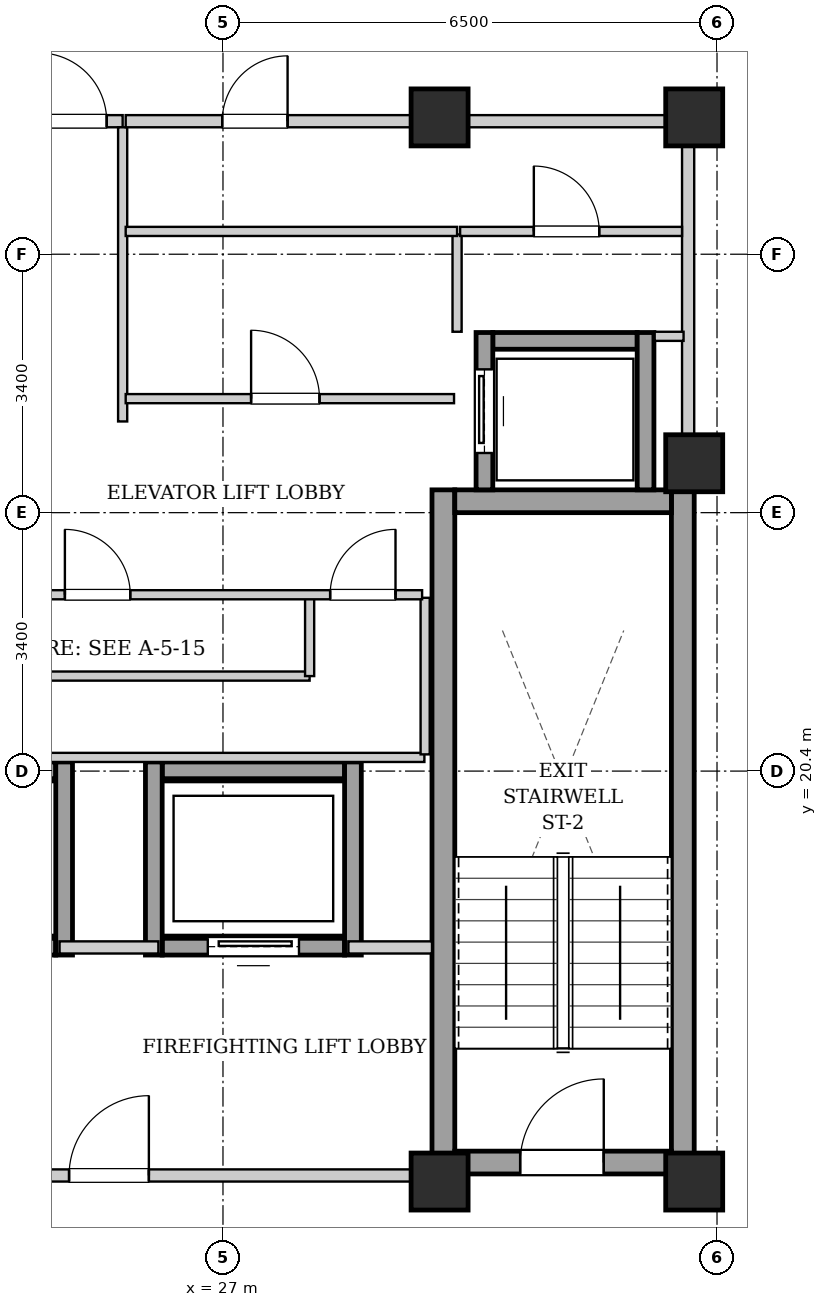
"""IFC4 building model, lengths in metres.
Left out: names, types, materials, properties, quantities, classifications, styles, units other than length and angle.
Written with IfcOpenShell. Run it as: python <this file> out.ifc"""

import sys

from ifc_helpers import new_model, si_unit, direction, frame, frame_2d, origin, origin_2d, place, context, subcontext, project, spatial, rectangle, extrude, element, fill, save


model = new_model("IFC4")
c1 = context("Model", 3, precision=1e-05, world=origin(), true_north=direction((0.0, 1.0)))
c2 = subcontext(c1, "Body", "Model", "MODEL_VIEW")
j1 = project(units=[si_unit("LENGTHUNIT", "METRE"), si_unit("PLANEANGLEUNIT", "RADIAN")], contexts=[c1])
p1 = place(None, origin())
s1 = spatial("IfcSite", under=j1, at=p1, CompositionType="ELEMENT")
p2 = place(p1, origin())
s2 = spatial("IfcBuilding", under=s1, at=p2, CompositionType="ELEMENT")
p3 = place(p2, frame((0.0, 0.0, 241.1)))
s3 = spatial("IfcBuildingStorey", under=s2, at=p3, CompositionType="ELEMENT", Elevation=241.1)
for number, where, z_axis, x_axis in (
    (1, (29.85, 15.0, 0.0), (0.0, 0.0, 1.0), (1.0, 0.0, 0.0)),
    (2, (33.2, 15.0, 0.0), (0.0, 0.0, 1.0), (1.0, 0.0, 0.0)),
    (3, (29.85, 29.0, 0.0), (0.0, 0.0, 1.0), (1.0, 0.0, 0.0)),
    (4, (33.2, 29.0, 0.0), (0.0, 0.0, 1.0), (1.0, 0.0, 0.0)),
    (5, (33.2, 24.45, 0.0), (0.0, 0.0, 1.0), (1.0, 0.0, 0.0)),
):
    element("IfcColumn", number, at=place(p3, frame(where, z_axis=z_axis, x_axis=x_axis)), inside=s3, PredefinedType="COLUMN", context=c2, shape_type="SweptSolid", body=[
        extrude(rectangle(XDim=0.75, YDim=0.75, at=origin_2d()), origin(), (0.0, 0.0, 1.0), 3.4),
    ])
for number, where, z_axis, x_axis in (
    (6, (29.9, 15.1, 0.0), (0.0, 0.0, 1.0), (0.0, 1.0, 0.0)),
    (7, (33.05, 15.1, 0.0), (0.0, 0.0, 1.0), (0.0, 1.0, 0.0)),
):
    element("IfcWall", number, at=place(p3, frame(where, z_axis=z_axis, x_axis=x_axis)), inside=s3, PredefinedType="SHEAR", context=c2, shape_type="SweptSolid", body=[
        extrude(rectangle(XDim=9.0, YDim=0.3, at=frame_2d((4.5, 0.0))), origin(), (0.0, 0.0, 1.0), 3.14),
    ])
p4 = place(p3, frame((30.05, 23.95, 0.0), z_axis=(0.0, 0.0, 1.0), x_axis=(1.0, 0.0, 0.0)))
e8 = element("IfcWall", 8, at=p4, inside=s3, PredefinedType="SHEAR", context=c2, shape_type="SweptSolid", body=[
    extrude(rectangle(XDim=2.85, YDim=0.3, at=frame_2d((1.425, 0.0))), origin(), (0.0, 0.0, 1.0), 3.14),
])
p5 = place(p3, frame((30.05, 15.25, 0.0), z_axis=(0.0, 0.0, 1.0), x_axis=(1.0, 0.0, 0.0)))
e9 = element("IfcWall", 9, at=p5, inside=s3, PredefinedType="SHEAR", context=c2, shape_type="SweptSolid", body=[
    extrude(rectangle(XDim=2.85, YDim=0.3, at=frame_2d((1.425, 0.0))), origin(), (0.0, 0.0, 1.0), 3.14),
])
p6 = place(p5, frame((0.86, 0.0, 0.0)))
e10 = element("IfcOpeningElement", 10, at=p6, cuts=e9, PredefinedType="OPENING", context=c2, shape_type="SweptSolid", body=[
    extrude(rectangle(XDim=1.1, YDim=2.05, at=frame_2d((0.55, 1.025))), frame((0.0, 0.16, 0.0), z_axis=(0.0, -1.0, 0.0), x_axis=(1.0, 0.0, 0.0)), (0.0, 0.0, 1.0), 0.32),
])
p7 = place(p3, frame((30.55, 26.06, 0.0), z_axis=(0.0, 0.0, 1.0), x_axis=(1.0, 0.0, 0.0)))
e11 = element("IfcWall", 11, at=p7, inside=s3, PredefinedType="SHEAR", context=c2, shape_type="SweptSolid", body=[
    extrude(rectangle(XDim=1.9, YDim=0.22, at=frame_2d((0.95, 0.0))), origin(), (0.0, 0.0, 1.0), 3.14),
])
p8 = place(p3, frame((30.44, 24.1, 0.0), z_axis=(0.0, 0.0, 1.0), x_axis=(0.0, 1.0, 0.0)))
e12 = element("IfcWall", 12, at=p8, inside=s3, PredefinedType="SHEAR", context=c2, shape_type="SweptSolid", body=[
    extrude(rectangle(XDim=2.07, YDim=0.22, at=frame_2d((1.035, 0.0))), origin(), (0.0, 0.0, 1.0), 3.14),
])
p9 = place(p8, frame((0.485, 0.0, 0.0)))
e13 = element("IfcOpeningElement", 13, at=p9, cuts=e12, PredefinedType="OPENING", context=c2, shape_type="SweptSolid", body=[
    extrude(rectangle(XDim=1.1, YDim=2.15, at=frame_2d((0.55, 1.075))), frame((0.0, 0.12, 0.0), z_axis=(0.0, -1.0, 0.0), x_axis=(1.0, 0.0, 0.0)), (0.0, 0.0, 1.0), 0.24),
])
p10 = place(p3, frame((32.56, 24.1, 0.0), z_axis=(0.0, 0.0, 1.0), x_axis=(0.0, 1.0, 0.0)))
e14 = element("IfcWall", 14, at=p10, inside=s3, PredefinedType="SHEAR", context=c2, shape_type="SweptSolid", body=[
    extrude(rectangle(XDim=2.07, YDim=0.22, at=frame_2d((1.035, 0.0))), origin(), (0.0, 0.0, 1.0), 3.14),
])
p11 = place(p3, frame((22.4, 18.09, 0.0), z_axis=(0.0, 0.0, 1.0), x_axis=(1.0, 0.0, 0.0)))
e15 = element("IfcWall", 15, at=p11, inside=s3, PredefinedType="SHEAR", context=c2, shape_type="SweptSolid", body=[
    extrude(rectangle(XDim=2.4, YDim=0.22, at=frame_2d((1.2, 0.0))), origin(), (0.0, 0.0, 1.0), 3.14),
])
p12 = place(p11, frame((0.6, 0.0, 0.0)))
e16 = element("IfcOpeningElement", 16, at=p12, cuts=e15, PredefinedType="OPENING", context=c2, shape_type="SweptSolid", body=[
    extrude(rectangle(XDim=1.2, YDim=2.15, at=frame_2d((0.6, 1.075))), frame((0.0, 0.12, 0.0), z_axis=(0.0, -1.0, 0.0), x_axis=(1.0, 0.0, 0.0)), (0.0, 0.0, 1.0), 0.24),
])
p13 = place(p3, frame((22.4, 20.41, 0.0), z_axis=(0.0, 0.0, 1.0), x_axis=(1.0, 0.0, 0.0)))
e17 = element("IfcWall", 17, at=p13, inside=s3, PredefinedType="SHEAR", context=c2, shape_type="SweptSolid", body=[
    extrude(rectangle(XDim=2.4, YDim=0.22, at=frame_2d((1.2, 0.0))), origin(), (0.0, 0.0, 1.0), 3.14),
])
p14 = place(p3, frame((24.91, 17.98, 0.0), z_axis=(0.0, 0.0, 1.0), x_axis=(0.0, 1.0, 0.0)))
e18 = element("IfcWall", 18, at=p14, inside=s3, PredefinedType="SHEAR", context=c2, shape_type="SweptSolid", body=[
    extrude(rectangle(XDim=2.54, YDim=0.22, at=frame_2d((1.27, 0.0))), origin(), (0.0, 0.0, 1.0), 3.14),
])
p15 = place(p3, frame((26.2, 18.09, 0.0), z_axis=(0.0, 0.0, 1.0), x_axis=(1.0, 0.0, 0.0)))
e19 = element("IfcWall", 19, at=p15, inside=s3, PredefinedType="SHEAR", context=c2, shape_type="SweptSolid", body=[
    extrude(rectangle(XDim=2.4, YDim=0.22, at=frame_2d((1.2, 0.0))), origin(), (0.0, 0.0, 1.0), 3.14),
])
p16 = place(p15, frame((0.6, 0.0, 0.0)))
e20 = element("IfcOpeningElement", 20, at=p16, cuts=e19, PredefinedType="OPENING", context=c2, shape_type="SweptSolid", body=[
    extrude(rectangle(XDim=1.2, YDim=2.15, at=frame_2d((0.6, 1.075))), frame((0.0, 0.12, 0.0), z_axis=(0.0, -1.0, 0.0), x_axis=(1.0, 0.0, 0.0)), (0.0, 0.0, 1.0), 0.24),
])
p17 = place(p3, frame((26.2, 20.41, 0.0), z_axis=(0.0, 0.0, 1.0), x_axis=(1.0, 0.0, 0.0)))
e21 = element("IfcWall", 21, at=p17, inside=s3, PredefinedType="SHEAR", context=c2, shape_type="SweptSolid", body=[
    extrude(rectangle(XDim=2.4, YDim=0.22, at=frame_2d((1.2, 0.0))), origin(), (0.0, 0.0, 1.0), 3.14),
])
for number, where, z_axis, x_axis in (
    (22, (26.09, 17.98, 0.0), (0.0, 0.0, 1.0), (0.0, 1.0, 0.0)),
    (23, (28.71, 17.98, 0.0), (0.0, 0.0, 1.0), (0.0, 1.0, 0.0)),
):
    element("IfcWall", number, at=place(p3, frame(where, z_axis=z_axis, x_axis=x_axis)), inside=s3, PredefinedType="SHEAR", context=c2, shape_type="SweptSolid", body=[
        extrude(rectangle(XDim=2.54, YDim=0.22, at=frame_2d((1.27, 0.0))), origin(), (0.0, 0.0, 1.0), 3.14),
    ])
p18 = place(p3, frame((21.25, 15.08, 0.0), z_axis=(0.0, 0.0, 1.0), x_axis=(1.0, 0.0, 0.0)))
e24 = element("IfcWall", 24, at=p18, inside=s3, PredefinedType="PARTITIONING", context=c2, shape_type="SweptSolid", body=[
    extrude(rectangle(XDim=8.5, YDim=0.16, at=frame_2d((4.25, 0.0))), origin(), (0.0, 0.0, 1.0), 2.668),
])
p19 = place(p18, frame((3.725, 0.0, 0.0)))
e25 = element("IfcOpeningElement", 25, at=p19, cuts=e24, PredefinedType="OPENING", context=c2, shape_type="SweptSolid", body=[
    extrude(rectangle(XDim=1.05, YDim=2.05, at=frame_2d((0.525, 1.025))), frame((0.0, 0.09, 0.0), z_axis=(0.0, -1.0, 0.0), x_axis=(1.0, 0.0, 0.0)), (0.0, 0.0, 1.0), 0.18),
])
p20 = place(p3, frame((24.85, 18.08, 0.0), z_axis=(0.0, 0.0, 1.0), x_axis=(1.0, 0.0, 0.0)))
e26 = element("IfcWall", 26, at=p20, inside=s3, PredefinedType="PARTITIONING", context=c2, shape_type="SweptSolid", body=[
    extrude(rectangle(XDim=1.3, YDim=0.16, at=frame_2d((0.65, 0.0))), origin(), (0.0, 0.0, 1.0), 3.14),
])
p21 = place(p3, frame((28.65, 18.08, 0.0), z_axis=(0.0, 0.0, 1.0), x_axis=(1.0, 0.0, 0.0)))
e27 = element("IfcWall", 27, at=p21, inside=s3, PredefinedType="PARTITIONING", context=c2, shape_type="SweptSolid", body=[
    extrude(rectangle(XDim=1.1, YDim=0.16, at=frame_2d((0.55, 0.0))), origin(), (0.0, 0.0, 1.0), 3.14),
])
p22 = place(p3, frame((33.12, 24.12, 0.0), z_axis=(0.0, 0.0, 1.0), x_axis=(0.0, 1.0, 0.0)))
e28 = element("IfcWall", 28, at=p22, inside=s3, PredefinedType="PARTITIONING", context=c2, shape_type="SweptSolid", body=[
    extrude(rectangle(XDim=4.76, YDim=0.16, at=frame_2d((2.38, 0.0))), origin(), (0.0, 0.0, 1.0), 3.14),
])
p23 = place(p3, frame((24.36, 28.95, 0.0), z_axis=(0.0, 0.0, 1.0), x_axis=(1.0, 0.0, 0.0)))
e29 = element("IfcWall", 29, at=p23, inside=s3, PredefinedType="PARTITIONING", context=c2, shape_type="SweptSolid", body=[
    extrude(rectangle(XDim=1.32, YDim=0.16, at=frame_2d((0.66, 0.0))), origin(), (0.0, 0.0, 1.0), 2.668),
])
p24 = place(p23, frame((0.21, 0.0, 0.0)))
e30 = element("IfcOpeningElement", 30, at=p24, cuts=e29, PredefinedType="OPENING", context=c2, shape_type="SweptSolid", body=[
    extrude(rectangle(XDim=0.9, YDim=2.05, at=frame_2d((0.45, 1.025))), frame((0.0, 0.09, 0.0), z_axis=(0.0, -1.0, 0.0), x_axis=(1.0, 0.0, 0.0)), (0.0, 0.0, 1.0), 0.18),
])
p25 = place(p3, frame((25.68, 25.0, 0.0), z_axis=(0.0, 0.0, 1.0), x_axis=(0.0, 1.0, 0.0)))
e31 = element("IfcWall", 31, at=p25, inside=s3, PredefinedType="PARTITIONING", context=c2, shape_type="SweptSolid", body=[
    extrude(rectangle(XDim=3.87, YDim=0.12, at=frame_2d((1.935, 0.0))), origin(), (0.0, 0.0, 1.0), 3.14),
])
p26 = place(p3, frame((30.08, 26.18, 0.0), z_axis=(0.0, 0.0, 1.0), x_axis=(0.0, 1.0, 0.0)))
e32 = element("IfcWall", 32, at=p26, inside=s3, PredefinedType="PARTITIONING", context=c2, shape_type="SweptSolid", body=[
    extrude(rectangle(XDim=1.28, YDim=0.12, at=frame_2d((0.64, 0.0))), origin(), (0.0, 0.0, 1.0), 3.14),
])
p27 = place(p3, frame((32.68, 26.12, 0.0), z_axis=(0.0, 0.0, 1.0), x_axis=(1.0, 0.0, 0.0)))
e33 = element("IfcWall", 33, at=p27, inside=s3, PredefinedType="PARTITIONING", context=c2, shape_type="SweptSolid", body=[
    extrude(rectangle(XDim=0.38, YDim=0.12, at=frame_2d((0.19, 0.0))), origin(), (0.0, 0.0, 1.0), 3.14),
])
p28 = place(p3, frame((30.12, 27.5, 0.0), z_axis=(0.0, 0.0, 1.0), x_axis=(1.0, 0.0, 0.0)))
e34 = element("IfcWall", 34, at=p28, inside=s3, PredefinedType="PARTITIONING", context=c2, shape_type="SweptSolid", body=[
    extrude(rectangle(XDim=2.92, YDim=0.12, at=frame_2d((1.46, 0.0))), origin(), (0.0, 0.0, 1.0), 3.14),
])
p29 = place(p28, frame((0.97, 0.0, 0.0)))
e35 = element("IfcOpeningElement", 35, at=p29, cuts=e34, PredefinedType="OPENING", context=c2, shape_type="SweptSolid", body=[
    extrude(rectangle(XDim=0.86, YDim=2.05, at=frame_2d((0.43, 1.025))), frame((0.0, 0.07, 0.0), z_axis=(0.0, -1.0, 0.0), x_axis=(1.0, 0.0, 0.0)), (0.0, 0.0, 1.0), 0.14),
])
p30 = place(p3, frame((25.72, 27.5, 0.0), z_axis=(0.0, 0.0, 1.0), x_axis=(1.0, 0.0, 0.0)))
e36 = element("IfcWall", 36, at=p30, inside=s3, PredefinedType="PARTITIONING", context=c2, shape_type="SweptSolid", body=[
    extrude(rectangle(XDim=4.36, YDim=0.12, at=frame_2d((2.18, 0.0))), origin(), (0.0, 0.0, 1.0), 3.14),
])
p31 = place(p3, frame((25.72, 25.3, 0.0), z_axis=(0.0, 0.0, 1.0), x_axis=(1.0, 0.0, 0.0)))
e37 = element("IfcWall", 37, at=p31, inside=s3, PredefinedType="PARTITIONING", context=c2, shape_type="SweptSolid", body=[
    extrude(rectangle(XDim=4.32, YDim=0.12, at=frame_2d((2.16, 0.0))), origin(), (0.0, 0.0, 1.0), 3.14),
])
p32 = place(p31, frame((1.65, 0.0, 0.0)))
e38 = element("IfcOpeningElement", 38, at=p32, cuts=e37, PredefinedType="OPENING", context=c2, shape_type="SweptSolid", body=[
    extrude(rectangle(XDim=0.9, YDim=2.05, at=frame_2d((0.45, 1.025))), frame((0.0, 0.07, 0.0), z_axis=(0.0, -1.0, 0.0), x_axis=(1.0, 0.0, 0.0)), (0.0, 0.0, 1.0), 0.14),
])
p33 = place(p3, frame((25.72, 28.95, 0.0), z_axis=(0.0, 0.0, 1.0), x_axis=(1.0, 0.0, 0.0)))
e39 = element("IfcWall", 39, at=p33, inside=s3, PredefinedType="PARTITIONING", context=c2, shape_type="SweptSolid", body=[
    extrude(rectangle(XDim=7.32, YDim=0.16, at=frame_2d((3.66, 0.0))), origin(), (0.0, 0.0, 1.0), 2.668),
])
p34 = place(p33, frame((1.27, 0.0, 0.0)))
e40 = element("IfcOpeningElement", 40, at=p34, cuts=e39, PredefinedType="OPENING", context=c2, shape_type="SweptSolid", body=[
    extrude(rectangle(XDim=0.86, YDim=2.05, at=frame_2d((0.43, 1.025))), frame((0.0, 0.09, 0.0), z_axis=(0.0, -1.0, 0.0), x_axis=(1.0, 0.0, 0.0)), (0.0, 0.0, 1.0), 0.18),
])
p35 = place(p3, frame((22.3, 20.58, 0.0), z_axis=(0.0, 0.0, 1.0), x_axis=(1.0, 0.0, 0.0)))
e41 = element("IfcWall", 41, at=p35, inside=s3, PredefinedType="PARTITIONING", context=c2, shape_type="SweptSolid", body=[
    extrude(rectangle(XDim=7.35, YDim=0.12, at=frame_2d((3.675, 0.0))), origin(), (0.0, 0.0, 1.0), 3.14),
])
p36 = place(p3, frame((29.66, 20.62, 0.0), z_axis=(0.0, 0.0, 1.0), x_axis=(0.0, 1.0, 0.0)))
e42 = element("IfcWall", 42, at=p36, inside=s3, PredefinedType="PARTITIONING", context=c2, shape_type="SweptSolid", body=[
    extrude(rectangle(XDim=2.06, YDim=0.12, at=frame_2d((1.03, 0.0))), origin(), (0.0, 0.0, 1.0), 3.14),
])
p37 = place(p3, frame((22.35, 21.65, 0.0), z_axis=(0.0, 0.0, 1.0), x_axis=(1.0, 0.0, 0.0)))
e43 = element("IfcWall", 43, at=p37, inside=s3, PredefinedType="PARTITIONING", context=c2, shape_type="SweptSolid", body=[
    extrude(rectangle(XDim=5.79, YDim=0.12, at=frame_2d((2.895, 0.0))), origin(), (0.0, 0.0, 1.0), 3.14),
])
p38 = place(p3, frame((28.14, 21.65, 0.0), z_axis=(0.0, 0.0, 1.0), x_axis=(0.0, 1.0, 0.0)))
e44 = element("IfcWall", 44, at=p38, inside=s3, PredefinedType="PARTITIONING", context=c2, shape_type="SweptSolid", body=[
    extrude(rectangle(XDim=1.03, YDim=0.12, at=frame_2d((0.515, 0.0))), origin(), (0.0, 0.0, 1.0), 3.14),
])
p39 = place(p3, frame((22.35, 22.72, 0.0), z_axis=(0.0, 0.0, 1.0), x_axis=(1.0, 0.0, 0.0)))
e45 = element("IfcWall", 45, at=p39, inside=s3, PredefinedType="PARTITIONING", context=c2, shape_type="SweptSolid", body=[
    extrude(rectangle(XDim=7.27, YDim=0.12, at=frame_2d((3.635, 0.0))), origin(), (0.0, 0.0, 1.0), 3.14),
])
p40 = place(p39, frame((2.57, 0.0, 0.0)))
e46 = element("IfcOpeningElement", 46, at=p40, cuts=e45, PredefinedType="OPENING", context=c2, shape_type="SweptSolid", body=[
    extrude(rectangle(XDim=0.86, YDim=2.05, at=frame_2d((0.43, 1.025))), frame((0.0, 0.07, 0.0), z_axis=(0.0, -1.0, 0.0), x_axis=(1.0, 0.0, 0.0)), (0.0, 0.0, 1.0), 0.14),
])
p41 = place(p39, frame((6.06, 0.0, 0.0)))
e47 = element("IfcOpeningElement", 47, at=p41, cuts=e45, PredefinedType="OPENING", context=c2, shape_type="SweptSolid", body=[
    extrude(rectangle(XDim=0.86, YDim=2.05, at=frame_2d((0.43, 1.025))), frame((0.0, 0.07, 0.0), z_axis=(0.0, -1.0, 0.0), x_axis=(1.0, 0.0, 0.0)), (0.0, 0.0, 1.0), 0.14),
])
p42 = place(p6, origin())
e48 = element("IfcDoor", 48, at=p42, inside=s3, OperationType="SINGLE_SWING_RIGHT", PredefinedType="DOOR", context=c2, shape_type="SweptSolid", body=[
    extrude(rectangle(XDim=1.1, YDim=2.05, at=frame_2d((0.55, 1.025))), frame((0.0, 0.025, 0.0), z_axis=(0.0, -1.0, 0.0), x_axis=(1.0, 0.0, 0.0)), (0.0, 0.0, 1.0), 0.05),
])
fill(e10, e48)
p43 = place(p9, origin())
e49 = element("IfcDoor", 49, at=p43, inside=s3, OperationType="SLIDING_TO_LEFT", PredefinedType="DOOR", context=c2, shape_type="SweptSolid", body=[
    extrude(rectangle(XDim=1.1, YDim=2.15, at=frame_2d((0.55, 1.075))), frame((0.0, 0.025, 0.0), z_axis=(0.0, -1.0, 0.0), x_axis=(1.0, 0.0, 0.0)), (0.0, 0.0, 1.0), 0.05),
])
fill(e13, e49)
p44 = place(p16, origin())
e50 = element("IfcDoor", 50, at=p44, inside=s3, OperationType="SLIDING_TO_LEFT", PredefinedType="DOOR", context=c2, shape_type="SweptSolid", body=[
    extrude(rectangle(XDim=1.2, YDim=2.15, at=frame_2d((0.6, 1.075))), frame((0.0, 0.025, 0.0), z_axis=(0.0, -1.0, 0.0), x_axis=(1.0, 0.0, 0.0)), (0.0, 0.0, 1.0), 0.05),
])
fill(e20, e50)
p45 = place(p19, origin())
e51 = element("IfcDoor", 51, at=p45, inside=s3, OperationType="SINGLE_SWING_RIGHT", PredefinedType="DOOR", context=c2, shape_type="SweptSolid", body=[
    extrude(rectangle(XDim=1.05, YDim=2.05, at=frame_2d((0.525, 1.025))), frame((0.0, 0.025, 0.0), z_axis=(0.0, -1.0, 0.0), x_axis=(1.0, 0.0, 0.0)), (0.0, 0.0, 1.0), 0.05),
])
fill(e25, e51)
p46 = place(p24, origin())
e52 = element("IfcDoor", 52, at=p46, inside=s3, OperationType="SINGLE_SWING_LEFT", PredefinedType="DOOR", context=c2, shape_type="SweptSolid", body=[
    extrude(rectangle(XDim=0.9, YDim=2.05, at=frame_2d((0.45, 1.025))), frame((0.0, 0.025, 0.0), z_axis=(0.0, -1.0, 0.0), x_axis=(1.0, 0.0, 0.0)), (0.0, 0.0, 1.0), 0.05),
])
fill(e30, e52)
p47 = place(p29, origin())
e53 = element("IfcDoor", 53, at=p47, inside=s3, OperationType="SINGLE_SWING_LEFT", PredefinedType="DOOR", context=c2, shape_type="SweptSolid", body=[
    extrude(rectangle(XDim=0.86, YDim=2.05, at=frame_2d((0.43, 1.025))), frame((0.0, 0.025, 0.0), z_axis=(0.0, -1.0, 0.0), x_axis=(1.0, 0.0, 0.0)), (0.0, 0.0, 1.0), 0.05),
])
fill(e35, e53)
p48 = place(p32, origin())
e54 = element("IfcDoor", 54, at=p48, inside=s3, OperationType="SINGLE_SWING_LEFT", PredefinedType="DOOR", context=c2, shape_type="SweptSolid", body=[
    extrude(rectangle(XDim=0.9, YDim=2.05, at=frame_2d((0.45, 1.025))), frame((0.0, 0.025, 0.0), z_axis=(0.0, -1.0, 0.0), x_axis=(1.0, 0.0, 0.0)), (0.0, 0.0, 1.0), 0.05),
])
fill(e38, e54)
p49 = place(p34, origin())
e55 = element("IfcDoor", 55, at=p49, inside=s3, OperationType="SINGLE_SWING_RIGHT", PredefinedType="DOOR", context=c2, shape_type="SweptSolid", body=[
    extrude(rectangle(XDim=0.86, YDim=2.05, at=frame_2d((0.43, 1.025))), frame((0.0, 0.025, 0.0), z_axis=(0.0, -1.0, 0.0), x_axis=(1.0, 0.0, 0.0)), (0.0, 0.0, 1.0), 0.05),
])
fill(e40, e55)
p50 = place(p40, origin())
e56 = element("IfcDoor", 56, at=p50, inside=s3, OperationType="SINGLE_SWING_LEFT", PredefinedType="DOOR", context=c2, shape_type="SweptSolid", body=[
    extrude(rectangle(XDim=0.86, YDim=2.05, at=frame_2d((0.43, 1.025))), frame((0.0, 0.025, 0.0), z_axis=(0.0, -1.0, 0.0), x_axis=(1.0, 0.0, 0.0)), (0.0, 0.0, 1.0), 0.05),
])
fill(e46, e56)
p51 = place(p41, origin())
e57 = element("IfcDoor", 57, at=p51, inside=s3, OperationType="SINGLE_SWING_RIGHT", PredefinedType="DOOR", context=c2, shape_type="SweptSolid", body=[
    extrude(rectangle(XDim=0.86, YDim=2.05, at=frame_2d((0.43, 1.025))), frame((0.0, 0.025, 0.0), z_axis=(0.0, -1.0, 0.0), x_axis=(1.0, 0.0, 0.0)), (0.0, 0.0, 1.0), 0.05),
])
fill(e47, e57)
save(model, sys.argv[1])
